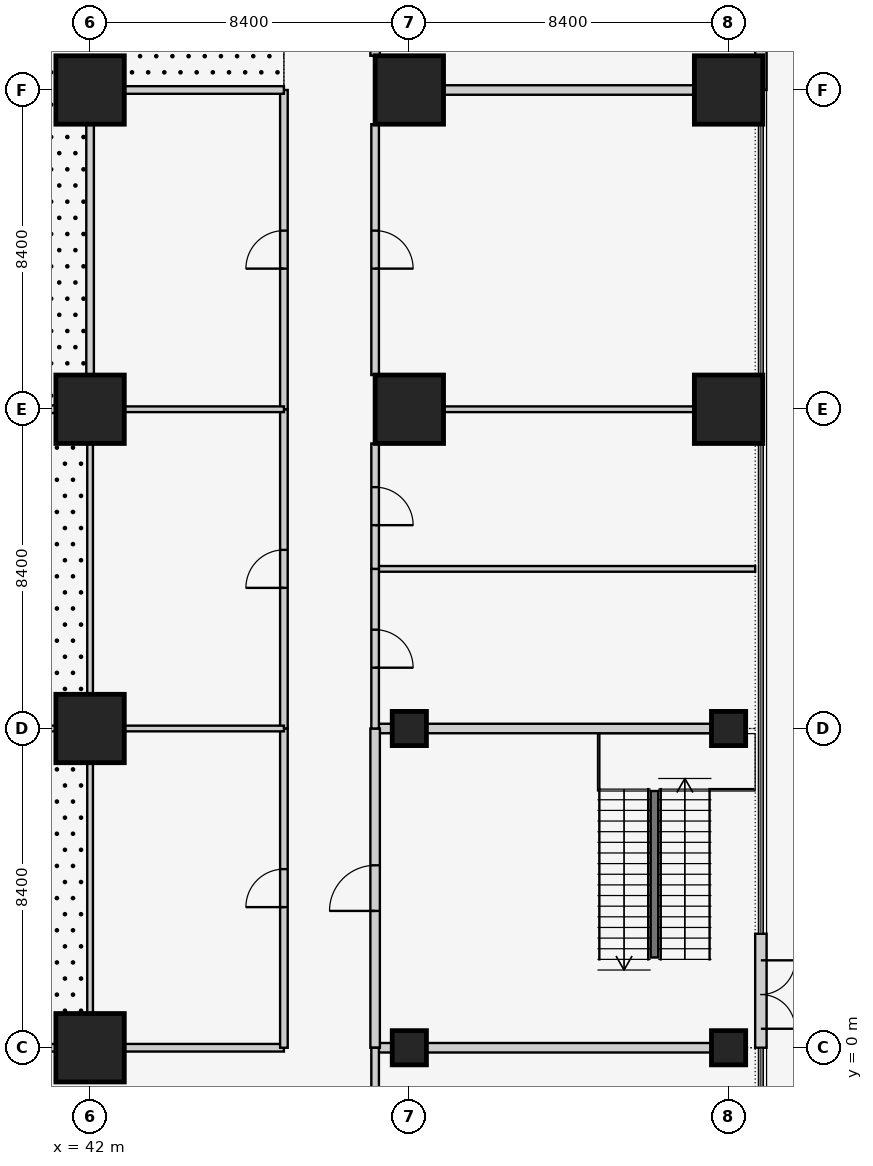
"""IFC4 building model, lengths in metres.
Left out: names, types, materials, properties, quantities, classifications, styles, units other than length and angle.
Written with IfcOpenShell. Run it as: python <this file> out.ifc"""

import sys

from ifc_helpers import new_model, si_unit, direction, frame, frame_2d, origin, origin_2d, place, context, subcontext, project, spatial, rectangle, extrude, element, fill, save


model = new_model("IFC4")
c1 = context("Model", 3, precision=1e-05, world=origin(), true_north=direction((0.0, 1.0)))
c2 = subcontext(c1, "Body", "Model", "MODEL_VIEW")
j1 = project(units=[si_unit("LENGTHUNIT", "METRE"), si_unit("PLANEANGLEUNIT", "RADIAN")], contexts=[c1])
p1 = place(None, origin())
s1 = spatial("IfcSite", under=j1, at=p1, CompositionType="ELEMENT")
p2 = place(p1, origin())
s2 = spatial("IfcBuilding", under=s1, at=p2, CompositionType="ELEMENT")
p3 = place(p2, origin())
s3 = spatial("IfcBuildingStorey", under=s2, at=p3, CompositionType="ELEMENT", Elevation=0.0)
for number, where, z_axis, x_axis in (
    (1, (42.0, 0.0, 0.0), (0.0, 0.0, 1.0), (1.0, 0.0, 0.0)),
    (2, (42.0, 8.4, 0.0), (0.0, 0.0, 1.0), (1.0, 0.0, 0.0)),
    (3, (42.0, 16.8, 0.0), (0.0, 0.0, 1.0), (1.0, 0.0, 0.0)),
    (4, (42.0, 25.2, 0.0), (0.0, 0.0, 1.0), (1.0, 0.0, 0.0)),
):
    element("IfcColumn", number, at=place(p3, frame(where, z_axis=z_axis, x_axis=x_axis)), inside=s3, PredefinedType="COLUMN", context=c2, shape_type="SweptSolid", body=[
        extrude(rectangle(XDim=1.8, YDim=1.8, at=origin_2d()), origin(), (0.0, 0.0, 1.0), 6.0),
    ])
for number, where, z_axis, x_axis in (
    (5, (50.4, 0.0, 0.0), (0.0, 0.0, 1.0), (1.0, 0.0, 0.0)),
    (6, (50.4, 8.4, 0.0), (0.0, 0.0, 1.0), (1.0, 0.0, 0.0)),
):
    element("IfcColumn", number, at=place(p3, frame(where, z_axis=z_axis, x_axis=x_axis)), inside=s3, PredefinedType="COLUMN", context=c2, shape_type="SweptSolid", body=[
        extrude(rectangle(XDim=0.9, YDim=0.9, at=origin_2d()), origin(), (0.0, 0.0, 1.0), 6.0),
    ])
for number, where, z_axis, x_axis in (
    (7, (50.4, 16.8, 0.0), (0.0, 0.0, 1.0), (1.0, 0.0, 0.0)),
    (8, (50.4, 25.2, 0.0), (0.0, 0.0, 1.0), (1.0, 0.0, 0.0)),
):
    element("IfcColumn", number, at=place(p3, frame(where, z_axis=z_axis, x_axis=x_axis)), inside=s3, PredefinedType="COLUMN", context=c2, shape_type="SweptSolid", body=[
        extrude(rectangle(XDim=1.8, YDim=1.8, at=origin_2d()), origin(), (0.0, 0.0, 1.0), 6.0),
    ])
for number, where, z_axis, x_axis in (
    (9, (58.8, 0.0, 0.0), (0.0, 0.0, 1.0), (1.0, 0.0, 0.0)),
    (10, (58.8, 8.4, 0.0), (0.0, 0.0, 1.0), (1.0, 0.0, 0.0)),
):
    element("IfcColumn", number, at=place(p3, frame(where, z_axis=z_axis, x_axis=x_axis)), inside=s3, PredefinedType="COLUMN", context=c2, shape_type="SweptSolid", body=[
        extrude(rectangle(XDim=0.9, YDim=0.9, at=origin_2d()), origin(), (0.0, 0.0, 1.0), 6.0),
    ])
for number, where, z_axis, x_axis in (
    (11, (58.8, 16.8, 0.0), (0.0, 0.0, 1.0), (1.0, 0.0, 0.0)),
    (12, (58.8, 25.2, 0.0), (0.0, 0.0, 1.0), (1.0, 0.0, 0.0)),
):
    element("IfcColumn", number, at=place(p3, frame(where, z_axis=z_axis, x_axis=x_axis)), inside=s3, PredefinedType="COLUMN", context=c2, shape_type="SweptSolid", body=[
        extrude(rectangle(XDim=1.8, YDim=1.8, at=origin_2d()), origin(), (0.0, 0.0, 1.0), 6.0),
    ])
p4 = place(p3, frame((59.65, 0.0, 0.0), z_axis=(0.0, 0.0, 1.0), x_axis=(0.0, 1.0, 0.0)))
e13 = element("IfcWall", 13, at=p4, inside=s3, PredefinedType="SOLIDWALL", context=c2, shape_type="SweptSolid", body=[
    extrude(rectangle(XDim=3.0, YDim=0.3, at=frame_2d((1.5, 0.0))), origin(), (0.0, 0.0, 1.0), 5.8),
])
p5 = place(p4, frame((0.5, 0.0, 0.0)))
e14 = element("IfcOpeningElement", 14, at=p5, cuts=e13, PredefinedType="OPENING", context=c2, shape_type="SweptSolid", body=[
    extrude(rectangle(XDim=1.8, YDim=2.4, at=frame_2d((0.9, 1.2))), frame((0.0, 0.16, 0.0), z_axis=(0.0, -1.0, 0.0), x_axis=(1.0, 0.0, 0.0)), (0.0, 0.0, 1.0), 0.32),
])
p6 = place(p3, frame((59.65, 25.2, 0.0), z_axis=(0.0, 0.0, 1.0), x_axis=(0.0, 1.0, 0.0)))
e15 = element("IfcWall", 15, at=p6, inside=s3, PredefinedType="SOLIDWALL", context=c2, shape_type="SweptSolid", body=[
    extrude(rectangle(XDim=33.2, YDim=0.3, at=frame_2d((16.6, 0.0))), origin(), (0.0, 0.0, 1.0), 5.8),
])
p7 = place(p6, frame((3.0, 0.0, 0.0)))
e16 = element("IfcOpeningElement", 16, at=p7, cuts=e15, PredefinedType="OPENING", context=c2, shape_type="SweptSolid", body=[
    extrude(rectangle(XDim=1.2, YDim=2.4, at=frame_2d((0.6, 1.2))), frame((0.0, 0.16, 0.0), z_axis=(0.0, -1.0, 0.0), x_axis=(1.0, 0.0, 0.0)), (0.0, 0.0, 1.0), 0.32),
])
p8 = place(p6, frame((20.4, 0.0, 0.0)))
e17 = element("IfcOpeningElement", 17, at=p8, cuts=e15, PredefinedType="OPENING", context=c2, shape_type="SweptSolid", body=[
    extrude(rectangle(XDim=1.2, YDim=2.4, at=frame_2d((0.6, 1.2))), frame((0.0, 0.16, 0.0), z_axis=(0.0, -1.0, 0.0), x_axis=(1.0, 0.0, 0.0)), (0.0, 0.0, 1.0), 0.32),
])
p9 = place(p6, frame((30.2, 0.0, 0.0)))
e18 = element("IfcOpeningElement", 18, at=p9, cuts=e15, PredefinedType="OPENING", context=c2, shape_type="SweptSolid", body=[
    extrude(rectangle(XDim=1.8, YDim=2.4, at=frame_2d((0.9, 1.2))), frame((0.0, 0.16, 0.0), z_axis=(0.0, -1.0, 0.0), x_axis=(1.0, 0.0, 0.0)), (0.0, 0.0, 1.0), 0.32),
])
p10 = place(p3, frame((57.9, 25.2, 0.0), z_axis=(0.0, 0.0, 1.0), x_axis=(-1.0, 0.0, 0.0)))
e19 = element("IfcWall", 19, at=p10, inside=s3, PredefinedType="SOLIDWALL", context=c2, shape_type="SweptSolid", body=[
    extrude(rectangle(XDim=6.6, YDim=0.25, at=frame_2d((3.3, 0.0))), origin(), (0.0, 0.0, 1.0), 5.043),
])
p11 = place(p3, frame((49.5, 26.1, 0.0), z_axis=(0.0, 0.0, 1.0), x_axis=(0.0, 1.0, 0.0)))
e20 = element("IfcWall", 20, at=p11, inside=s3, PredefinedType="SOLIDWALL", context=c2, shape_type="SweptSolid", body=[
    extrude(rectangle(XDim=6.6, YDim=0.25, at=frame_2d((3.3, 0.0))), origin(), (0.0, 0.0, 1.0), 5.8),
])
p12 = place(p11, frame((2.0, 0.0, 0.0)))
e21 = element("IfcOpeningElement", 21, at=p12, cuts=e20, PredefinedType="OPENING", context=c2, shape_type="SweptSolid", body=[
    extrude(rectangle(XDim=2.6, YDim=2.4, at=frame_2d((1.3, 1.2))), frame((0.0, 0.135, 0.0), z_axis=(0.0, -1.0, 0.0), x_axis=(1.0, 0.0, 0.0)), (0.0, 0.0, 1.0), 0.27),
])
p13 = place(p3, frame((49.95, 0.0, 0.0), z_axis=(0.0, 0.0, 1.0), x_axis=(-1.0, 0.0, 0.0)))
e22 = element("IfcWall", 22, at=p13, inside=s3, PredefinedType="SOLIDWALL", context=c2, shape_type="SweptSolid", body=[
    extrude(rectangle(XDim=0.45, YDim=0.25, at=frame_2d((0.225, 0.0))), origin(), (0.0, 0.0, 1.0), 5.043),
])
p14 = place(p3, frame((58.35, 0.0, 0.0), z_axis=(0.0, 0.0, 1.0), x_axis=(-1.0, 0.0, 0.0)))
e23 = element("IfcWall", 23, at=p14, inside=s3, PredefinedType="SOLIDWALL", context=c2, shape_type="SweptSolid", body=[
    extrude(rectangle(XDim=7.5, YDim=0.25, at=frame_2d((3.75, 0.0))), origin(), (0.0, 0.0, 1.0), 5.043),
])
p15 = place(p3, frame((49.5, 8.4, 0.0), z_axis=(0.0, 0.0, 1.0), x_axis=(1.0, 0.0, 0.0)))
e24 = element("IfcWall", 24, at=p15, inside=s3, PredefinedType="SOLIDWALL", context=c2, shape_type="SweptSolid", body=[
    extrude(rectangle(XDim=0.45, YDim=0.25, at=frame_2d((0.225, 0.0))), origin(), (0.0, 0.0, 1.0), 5.043),
])
p16 = place(p3, frame((50.85, 8.4, 0.0), z_axis=(0.0, 0.0, 1.0), x_axis=(1.0, 0.0, 0.0)))
e25 = element("IfcWall", 25, at=p16, inside=s3, PredefinedType="SOLIDWALL", context=c2, shape_type="SweptSolid", body=[
    extrude(rectangle(XDim=7.5, YDim=0.25, at=frame_2d((3.75, 0.0))), origin(), (0.0, 0.0, 1.0), 5.043),
])
p17 = place(p3, frame((49.5, 0.0, 0.0), z_axis=(0.0, 0.0, 1.0), x_axis=(0.0, 1.0, 0.0)))
e26 = element("IfcWall", 26, at=p17, inside=s3, PredefinedType="SOLIDWALL", context=c2, shape_type="SweptSolid", body=[
    extrude(rectangle(XDim=8.4, YDim=0.25, at=frame_2d((4.2, 0.0))), origin(), (0.0, 0.0, 1.0), 5.8),
])
p18 = place(p17, frame((3.6, 0.0, 0.0)))
e27 = element("IfcOpeningElement", 27, at=p18, cuts=e26, PredefinedType="OPENING", context=c2, shape_type="SweptSolid", body=[
    extrude(rectangle(XDim=1.2, YDim=2.1, at=frame_2d((0.6, 1.05))), frame((0.0, 0.135, 0.0), z_axis=(0.0, -1.0, 0.0), x_axis=(1.0, 0.0, 0.0)), (0.0, 0.0, 1.0), 0.27),
])
p19 = place(p3, frame((49.5, -8.4, 0.0), z_axis=(0.0, 0.0, 1.0), x_axis=(0.0, 1.0, 0.0)))
e28 = element("IfcWall", 28, at=p19, inside=s3, PredefinedType="PARTITIONING", context=c2, shape_type="SweptSolid", body=[
    extrude(rectangle(XDim=8.4, YDim=0.2, at=frame_2d((4.2, 0.0))), origin(), (0.0, 0.0, 1.0), 5.8),
])
p20 = place(p19, frame((3.7, 0.0, 0.0)))
e29 = element("IfcOpeningElement", 29, at=p20, cuts=e28, PredefinedType="OPENING", context=c2, shape_type="SweptSolid", body=[
    extrude(rectangle(XDim=1.0, YDim=2.1, at=frame_2d((0.5, 1.05))), frame((0.0, 0.11, 0.0), z_axis=(0.0, -1.0, 0.0), x_axis=(1.0, 0.0, 0.0)), (0.0, 0.0, 1.0), 0.22),
])
p21 = place(p3, frame((49.5, 12.6, 0.0), z_axis=(0.0, 0.0, 1.0), x_axis=(1.0, 0.0, 0.0)))
e30 = element("IfcWall", 30, at=p21, inside=s3, PredefinedType="PARTITIONING", context=c2, shape_type="SweptSolid", body=[
    extrude(rectangle(XDim=10.0, YDim=0.15, at=frame_2d((5.0, 0.0))), origin(), (0.0, 0.0, 1.0), 5.8),
])
p22 = place(p3, frame((49.5, 8.4, 0.0), z_axis=(0.0, 0.0, 1.0), x_axis=(0.0, 1.0, 0.0)))
e31 = element("IfcWall", 31, at=p22, inside=s3, PredefinedType="PARTITIONING", context=c2, shape_type="SweptSolid", body=[
    extrude(rectangle(XDim=4.2, YDim=0.2, at=frame_2d((2.1, 0.0))), origin(), (0.0, 0.0, 1.0), 5.8),
])
p23 = place(p22, frame((1.6, 0.0, 0.0)))
e32 = element("IfcOpeningElement", 32, at=p23, cuts=e31, PredefinedType="OPENING", context=c2, shape_type="SweptSolid", body=[
    extrude(rectangle(XDim=1.0, YDim=2.1, at=frame_2d((0.5, 1.05))), frame((0.0, 0.11, 0.0), z_axis=(0.0, -1.0, 0.0), x_axis=(1.0, 0.0, 0.0)), (0.0, 0.0, 1.0), 0.22),
])
p24 = place(p3, frame((51.3, 16.8, 0.0), z_axis=(0.0, 0.0, 1.0), x_axis=(1.0, 0.0, 0.0)))
e33 = element("IfcWall", 33, at=p24, inside=s3, PredefinedType="PARTITIONING", context=c2, shape_type="SweptSolid", body=[
    extrude(rectangle(XDim=6.6, YDim=0.15, at=frame_2d((3.3, 0.0))), origin(), (0.0, 0.0, 1.0), 5.043),
])
p25 = place(p3, frame((49.5, 12.6, 0.0), z_axis=(0.0, 0.0, 1.0), x_axis=(0.0, 1.0, 0.0)))
e34 = element("IfcWall", 34, at=p25, inside=s3, PredefinedType="PARTITIONING", context=c2, shape_type="SweptSolid", body=[
    extrude(rectangle(XDim=3.3, YDim=0.2, at=frame_2d((1.65, 0.0))), origin(), (0.0, 0.0, 1.0), 5.8),
])
p26 = place(p25, frame((1.15, 0.0, 0.0)))
e35 = element("IfcOpeningElement", 35, at=p26, cuts=e34, PredefinedType="OPENING", context=c2, shape_type="SweptSolid", body=[
    extrude(rectangle(XDim=1.0, YDim=2.1, at=frame_2d((0.5, 1.05))), frame((0.0, 0.11, 0.0), z_axis=(0.0, -1.0, 0.0), x_axis=(1.0, 0.0, 0.0)), (0.0, 0.0, 1.0), 0.22),
])
p27 = place(p3, frame((49.5, 17.7, 0.0), z_axis=(0.0, 0.0, 1.0), x_axis=(0.0, 1.0, 0.0)))
e36 = element("IfcWall", 36, at=p27, inside=s3, PredefinedType="PARTITIONING", context=c2, shape_type="SweptSolid", body=[
    extrude(rectangle(XDim=6.6, YDim=0.2, at=frame_2d((3.3, 0.0))), origin(), (0.0, 0.0, 1.0), 5.8),
])
p28 = place(p27, frame((2.8, 0.0, 0.0)))
e37 = element("IfcOpeningElement", 37, at=p28, cuts=e36, PredefinedType="OPENING", context=c2, shape_type="SweptSolid", body=[
    extrude(rectangle(XDim=1.0, YDim=2.1, at=frame_2d((0.5, 1.05))), frame((0.0, 0.11, 0.0), z_axis=(0.0, -1.0, 0.0), x_axis=(1.0, 0.0, 0.0)), (0.0, 0.0, 1.0), 0.22),
])
p29 = place(p3, frame((34.5, 0.0, 0.0), z_axis=(0.0, 0.0, 1.0), x_axis=(1.0, 0.0, 0.0)))
e38 = element("IfcWall", 38, at=p29, inside=s3, PredefinedType="PARTITIONING", context=c2, shape_type="SweptSolid", body=[
    extrude(rectangle(XDim=6.6, YDim=0.2, at=frame_2d((3.3, 0.0))), origin(), (0.0, 0.0, 1.0), 5.043),
])
p30 = place(p29, frame((4.5, 0.0, 0.0)))
e39 = element("IfcOpeningElement", 39, at=p30, cuts=e38, PredefinedType="OPENING", context=c2, shape_type="SweptSolid", body=[
    extrude(rectangle(XDim=1.8, YDim=2.4, at=frame_2d((0.9, 1.2))), frame((0.0, 0.11, 0.0), z_axis=(0.0, -1.0, 0.0), x_axis=(1.0, 0.0, 0.0)), (0.0, 0.0, 1.0), 0.22),
])
p31 = place(p3, frame((42.9, 0.0, 0.0), z_axis=(0.0, 0.0, 1.0), x_axis=(1.0, 0.0, 0.0)))
e40 = element("IfcWall", 40, at=p31, inside=s3, PredefinedType="PARTITIONING", context=c2, shape_type="SweptSolid", body=[
    extrude(rectangle(XDim=4.2, YDim=0.2, at=frame_2d((2.1, 0.0))), origin(), (0.0, 0.0, 1.0), 5.043),
])
p32 = place(p3, frame((47.1, 0.0, 0.0), z_axis=(0.0, 0.0, 1.0), x_axis=(0.0, 1.0, 0.0)))
e41 = element("IfcWall", 41, at=p32, inside=s3, PredefinedType="PARTITIONING", context=c2, shape_type="SweptSolid", body=[
    extrude(rectangle(XDim=8.4, YDim=0.2, at=frame_2d((4.2, 0.0))), origin(), (0.0, 0.0, 1.0), 5.8),
])
p33 = place(p32, frame((3.7, 0.0, 0.0)))
e42 = element("IfcOpeningElement", 42, at=p33, cuts=e41, PredefinedType="OPENING", context=c2, shape_type="SweptSolid", body=[
    extrude(rectangle(XDim=1.0, YDim=2.1, at=frame_2d((0.5, 1.05))), frame((0.0, 0.11, 0.0), z_axis=(0.0, -1.0, 0.0), x_axis=(1.0, 0.0, 0.0)), (0.0, 0.0, 1.0), 0.22),
])
p34 = place(p3, frame((47.1, 8.4, 0.0), z_axis=(0.0, 0.0, 1.0), x_axis=(0.0, 1.0, 0.0)))
e43 = element("IfcWall", 43, at=p34, inside=s3, PredefinedType="PARTITIONING", context=c2, shape_type="SweptSolid", body=[
    extrude(rectangle(XDim=8.4, YDim=0.2, at=frame_2d((4.2, 0.0))), origin(), (0.0, 0.0, 1.0), 5.8),
])
p35 = place(p34, frame((3.7, 0.0, 0.0)))
e44 = element("IfcOpeningElement", 44, at=p35, cuts=e43, PredefinedType="OPENING", context=c2, shape_type="SweptSolid", body=[
    extrude(rectangle(XDim=1.0, YDim=2.1, at=frame_2d((0.5, 1.05))), frame((0.0, 0.11, 0.0), z_axis=(0.0, -1.0, 0.0), x_axis=(1.0, 0.0, 0.0)), (0.0, 0.0, 1.0), 0.22),
])
p36 = place(p3, frame((47.1, 16.8, 0.0), z_axis=(0.0, 0.0, 1.0), x_axis=(0.0, 1.0, 0.0)))
e45 = element("IfcWall", 45, at=p36, inside=s3, PredefinedType="PARTITIONING", context=c2, shape_type="SweptSolid", body=[
    extrude(rectangle(XDim=8.4, YDim=0.2, at=frame_2d((4.2, 0.0))), origin(), (0.0, 0.0, 1.0), 5.8),
])
p37 = place(p36, frame((3.7, 0.0, 0.0)))
e46 = element("IfcOpeningElement", 46, at=p37, cuts=e45, PredefinedType="OPENING", context=c2, shape_type="SweptSolid", body=[
    extrude(rectangle(XDim=1.0, YDim=2.1, at=frame_2d((0.5, 1.05))), frame((0.0, 0.11, 0.0), z_axis=(0.0, -1.0, 0.0), x_axis=(1.0, 0.0, 0.0)), (0.0, 0.0, 1.0), 0.22),
])
p38 = place(p3, frame((41.1, 16.8, 0.0), z_axis=(0.0, 0.0, 1.0), x_axis=(-1.0, 0.0, 0.0)))
e47 = element("IfcWall", 47, at=p38, inside=s3, PredefinedType="PARTITIONING", context=c2, shape_type="SweptSolid", body=[
    extrude(rectangle(XDim=2.8, YDim=0.2, at=frame_2d((1.4, 0.0))), origin(), (0.0, 0.0, 1.0), 5.043),
])
p39 = place(p38, frame((0.3, 0.0, 0.0)))
e48 = element("IfcOpeningElement", 48, at=p39, cuts=e47, PredefinedType="OPENING", context=c2, shape_type="SweptSolid", body=[
    extrude(rectangle(XDim=1.8, YDim=2.4, at=frame_2d((0.9, 1.2))), frame((0.0, 0.11, 0.0), z_axis=(0.0, -1.0, 0.0), x_axis=(1.0, 0.0, 0.0)), (0.0, 0.0, 1.0), 0.22),
])
p40 = place(p3, frame((42.0, 24.3, 0.0), z_axis=(0.0, 0.0, 1.0), x_axis=(0.0, -1.0, 0.0)))
e49 = element("IfcWall", 49, at=p40, inside=s3, PredefinedType="PARTITIONING", context=c2, shape_type="SweptSolid", body=[
    extrude(rectangle(XDim=6.6, YDim=0.2, at=frame_2d((3.3, 0.0))), origin(), (0.0, 0.0, 1.0), 5.043),
])
p41 = place(p3, frame((47.1, 25.2, 0.0), z_axis=(0.0, 0.0, 1.0), x_axis=(-1.0, 0.0, 0.0)))
e50 = element("IfcWall", 50, at=p41, inside=s3, PredefinedType="PARTITIONING", context=c2, shape_type="SweptSolid", body=[
    extrude(rectangle(XDim=4.2, YDim=0.2, at=frame_2d((2.1, 0.0))), origin(), (0.0, 0.0, 1.0), 5.043),
])
for number, where, z_axis, x_axis in (
    (51, (42.0, 7.5, 0.0), (0.0, 0.0, 1.0), (0.0, -1.0, 0.0)),
    (52, (34.5, 8.4, 0.0), (0.0, 0.0, 1.0), (1.0, 0.0, 0.0)),
):
    element("IfcWall", number, at=place(p3, frame(where, z_axis=z_axis, x_axis=x_axis)), inside=s3, PredefinedType="PARTITIONING", context=c2, shape_type="SweptSolid", body=[
        extrude(rectangle(XDim=6.6, YDim=0.15, at=frame_2d((3.3, 0.0))), origin(), (0.0, 0.0, 1.0), 5.043),
    ])
p42 = place(p3, frame((42.9, 8.4, 0.0), z_axis=(0.0, 0.0, 1.0), x_axis=(1.0, 0.0, 0.0)))
e53 = element("IfcWall", 53, at=p42, inside=s3, PredefinedType="PARTITIONING", context=c2, shape_type="SweptSolid", body=[
    extrude(rectangle(XDim=4.2, YDim=0.15, at=frame_2d((2.1, 0.0))), origin(), (0.0, 0.0, 1.0), 5.043),
])
p43 = place(p3, frame((42.0, 15.9, 0.0), z_axis=(0.0, 0.0, 1.0), x_axis=(0.0, -1.0, 0.0)))
e54 = element("IfcWall", 54, at=p43, inside=s3, PredefinedType="PARTITIONING", context=c2, shape_type="SweptSolid", body=[
    extrude(rectangle(XDim=6.6, YDim=0.15, at=frame_2d((3.3, 0.0))), origin(), (0.0, 0.0, 1.0), 5.043),
])
p44 = place(p3, frame((42.9, 16.8, 0.0), z_axis=(0.0, 0.0, 1.0), x_axis=(1.0, 0.0, 0.0)))
e55 = element("IfcWall", 55, at=p44, inside=s3, PredefinedType="PARTITIONING", context=c2, shape_type="SweptSolid", body=[
    extrude(rectangle(XDim=4.2, YDim=0.15, at=frame_2d((2.1, 0.0))), origin(), (0.0, 0.0, 1.0), 5.043),
])
p45 = place(p3, frame((56.85, 2.375, 0.0), z_axis=(0.0, 0.0, 1.0), x_axis=(0.0, 1.0, 0.0)))
e56 = element("IfcWall", 56, at=p45, inside=s3, PredefinedType="SOLIDWALL", context=c2, shape_type="SweptSolid", body=[
    extrude(rectangle(XDim=4.38, YDim=0.2, at=frame_2d((2.19, 0.0))), origin(), (0.0, 0.0, 1.0), 6.0),
])
p46 = place(p5, frame((1.8, 0.0, 0.0), z_axis=(0.0, 0.0, 1.0), x_axis=(-1.0, 0.0, 0.0)))
e57 = element("IfcDoor", 57, at=p46, inside=s3, OperationType="DOUBLE_DOOR_SINGLE_SWING", PredefinedType="DOOR", context=c2, shape_type="SweptSolid", body=[
    extrude(rectangle(XDim=1.8, YDim=2.4, at=frame_2d((0.9, 1.2))), frame((0.0, 0.025, 0.0), z_axis=(0.0, -1.0, 0.0), x_axis=(1.0, 0.0, 0.0)), (0.0, 0.0, 1.0), 0.05),
])
fill(e14, e57)
p47 = place(p18, origin())
e58 = element("IfcDoor", 58, at=p47, inside=s3, OperationType="SINGLE_SWING_LEFT", PredefinedType="DOOR", context=c2, shape_type="SweptSolid", body=[
    extrude(rectangle(XDim=1.2, YDim=2.1, at=frame_2d((0.6, 1.05))), frame((0.0, 0.025, 0.0), z_axis=(0.0, -1.0, 0.0), x_axis=(1.0, 0.0, 0.0)), (0.0, 0.0, 1.0), 0.05),
])
fill(e27, e58)
p48 = place(p23, frame((1.0, 0.0, 0.0), z_axis=(0.0, 0.0, 1.0), x_axis=(-1.0, 0.0, 0.0)))
e59 = element("IfcDoor", 59, at=p48, inside=s3, OperationType="SINGLE_SWING_RIGHT", PredefinedType="DOOR", context=c2, shape_type="SweptSolid", body=[
    extrude(rectangle(XDim=1.0, YDim=2.1, at=frame_2d((0.5, 1.05))), frame((0.0, 0.025, 0.0), z_axis=(0.0, -1.0, 0.0), x_axis=(1.0, 0.0, 0.0)), (0.0, 0.0, 1.0), 0.05),
])
fill(e32, e59)
p49 = place(p26, frame((1.0, 0.0, 0.0), z_axis=(0.0, 0.0, 1.0), x_axis=(-1.0, 0.0, 0.0)))
e60 = element("IfcDoor", 60, at=p49, inside=s3, OperationType="SINGLE_SWING_RIGHT", PredefinedType="DOOR", context=c2, shape_type="SweptSolid", body=[
    extrude(rectangle(XDim=1.0, YDim=2.1, at=frame_2d((0.5, 1.05))), frame((0.0, 0.025, 0.0), z_axis=(0.0, -1.0, 0.0), x_axis=(1.0, 0.0, 0.0)), (0.0, 0.0, 1.0), 0.05),
])
fill(e35, e60)
p50 = place(p28, frame((1.0, 0.0, 0.0), z_axis=(0.0, 0.0, 1.0), x_axis=(-1.0, 0.0, 0.0)))
e61 = element("IfcDoor", 61, at=p50, inside=s3, OperationType="SINGLE_SWING_RIGHT", PredefinedType="DOOR", context=c2, shape_type="SweptSolid", body=[
    extrude(rectangle(XDim=1.0, YDim=2.1, at=frame_2d((0.5, 1.05))), frame((0.0, 0.025, 0.0), z_axis=(0.0, -1.0, 0.0), x_axis=(1.0, 0.0, 0.0)), (0.0, 0.0, 1.0), 0.05),
])
fill(e37, e61)
p51 = place(p33, origin())
e62 = element("IfcDoor", 62, at=p51, inside=s3, OperationType="SINGLE_SWING_LEFT", PredefinedType="DOOR", context=c2, shape_type="SweptSolid", body=[
    extrude(rectangle(XDim=1.0, YDim=2.1, at=frame_2d((0.5, 1.05))), frame((0.0, 0.025, 0.0), z_axis=(0.0, -1.0, 0.0), x_axis=(1.0, 0.0, 0.0)), (0.0, 0.0, 1.0), 0.05),
])
fill(e42, e62)
p52 = place(p35, origin())
e63 = element("IfcDoor", 63, at=p52, inside=s3, OperationType="SINGLE_SWING_LEFT", PredefinedType="DOOR", context=c2, shape_type="SweptSolid", body=[
    extrude(rectangle(XDim=1.0, YDim=2.1, at=frame_2d((0.5, 1.05))), frame((0.0, 0.025, 0.0), z_axis=(0.0, -1.0, 0.0), x_axis=(1.0, 0.0, 0.0)), (0.0, 0.0, 1.0), 0.05),
])
fill(e44, e63)
p53 = place(p37, origin())
e64 = element("IfcDoor", 64, at=p53, inside=s3, OperationType="SINGLE_SWING_LEFT", PredefinedType="DOOR", context=c2, shape_type="SweptSolid", body=[
    extrude(rectangle(XDim=1.0, YDim=2.1, at=frame_2d((0.5, 1.05))), frame((0.0, 0.025, 0.0), z_axis=(0.0, -1.0, 0.0), x_axis=(1.0, 0.0, 0.0)), (0.0, 0.0, 1.0), 0.05),
])
fill(e46, e64)
save(model, sys.argv[1])
